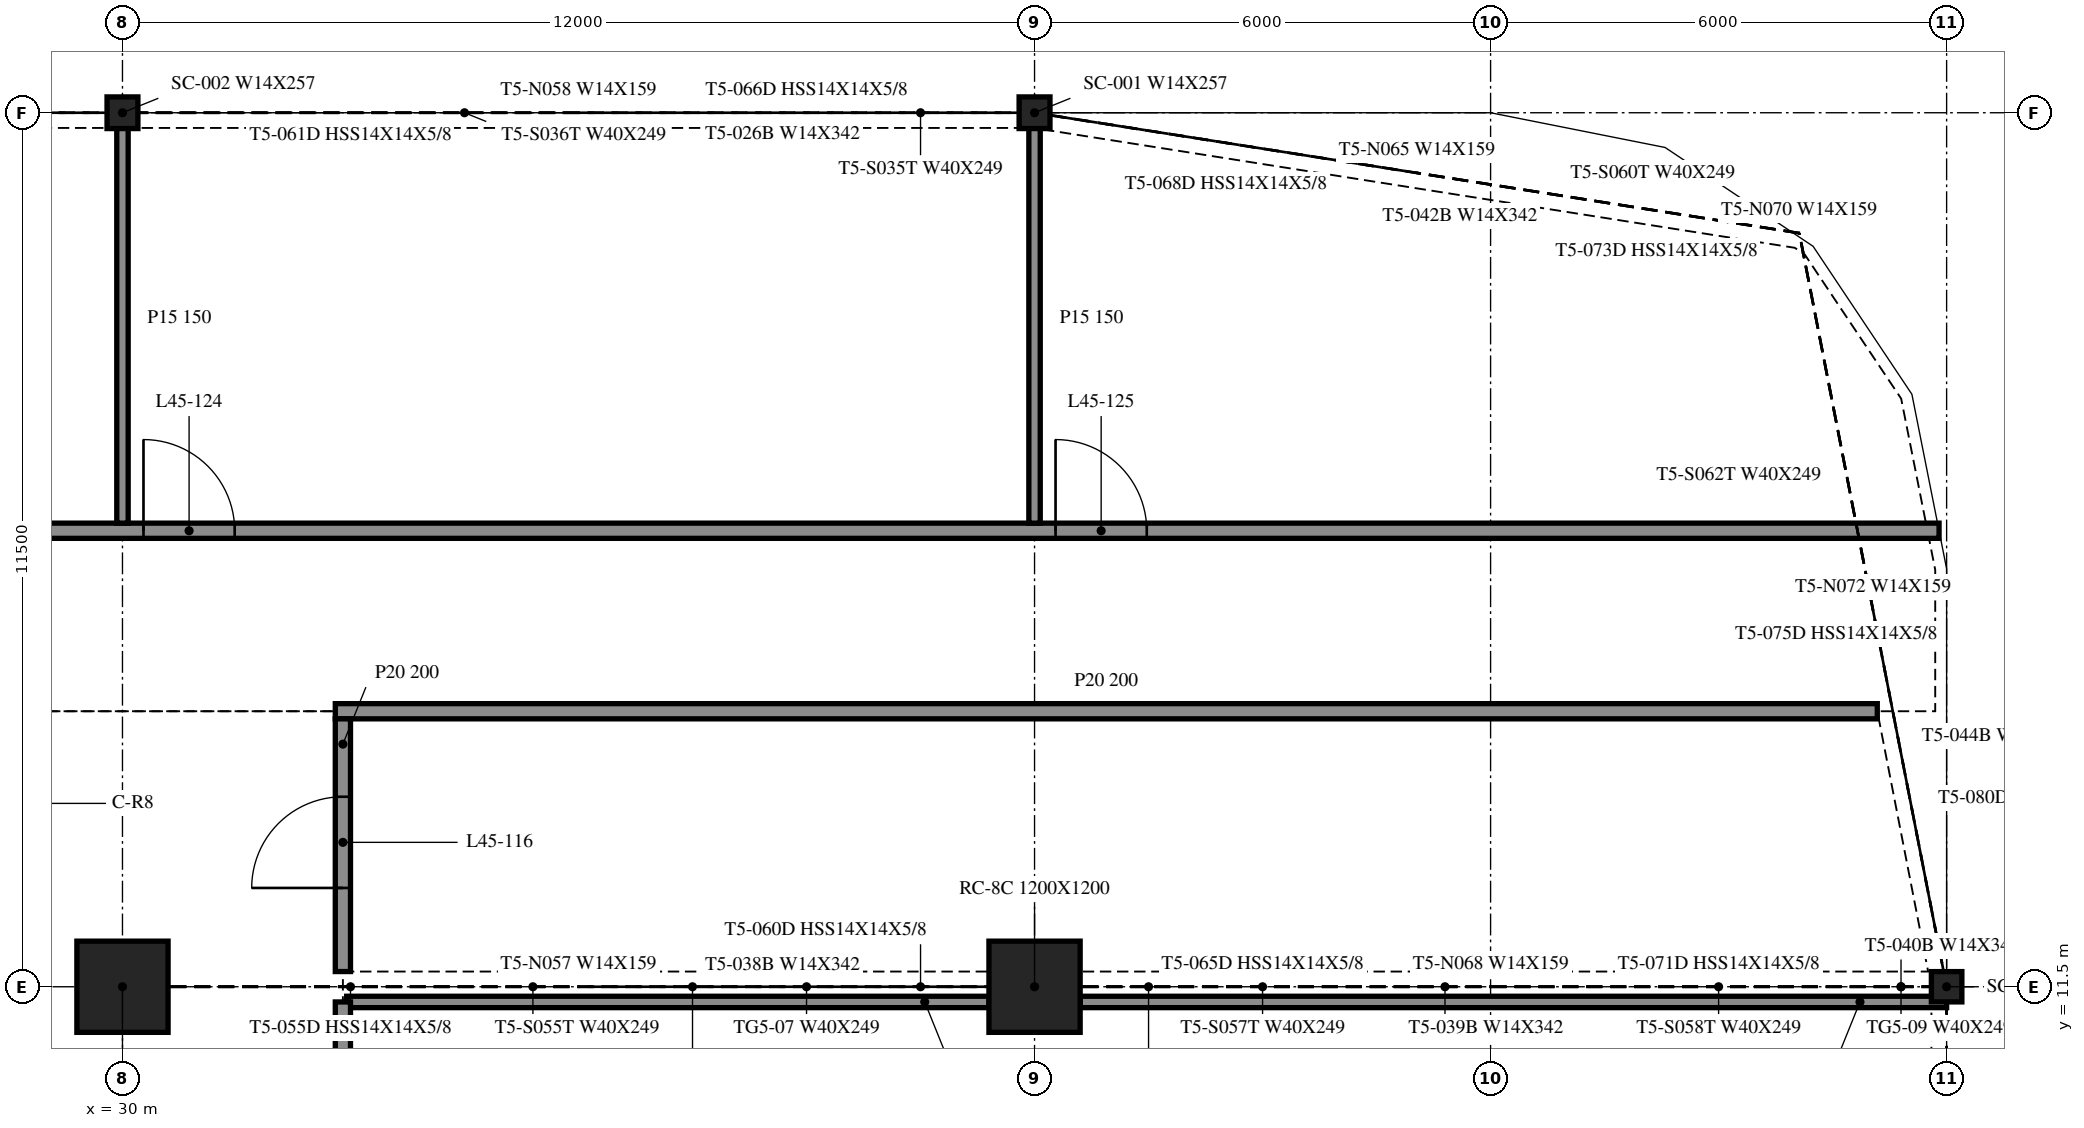
"""IFC4 building model, lengths in metres.
Left out: names, types, materials, properties, quantities, classifications, styles, units other than length and angle.
Written with IfcOpenShell. Run it as: python <this file> out.ifc"""

import sys

from ifc_helpers import new_model, si_unit, direction, frame, frame_2d, origin, origin_2d, place, context, subcontext, project, spatial, rectangle, i_section, extrude, element, fill, save


model = new_model("IFC4")
c1 = context("Model", 3, precision=1e-05, world=origin(), true_north=direction((0.0, 1.0)))
c2 = subcontext(c1, "Body", "Model", "MODEL_VIEW")
j1 = project(units=[si_unit("LENGTHUNIT", "METRE"), si_unit("PLANEANGLEUNIT", "RADIAN")], contexts=[c1])
p1 = place(None, origin())
s1 = spatial("IfcSite", under=j1, at=p1, CompositionType="ELEMENT")
p2 = place(p1, origin())
s2 = spatial("IfcBuilding", under=s1, at=p2, CompositionType="ELEMENT")
p3 = place(p2, frame((0.0, 0.0, 189.6)))
s3 = spatial("IfcBuildingStorey", under=s2, at=p3, CompositionType="ELEMENT", Elevation=189.6)
for number, where, z_axis, x_axis in (
    (1, (30.0, 11.5, -0.4), (0.0, 0.0, 1.0), (1.0, 0.0, 0.0)),
    (2, (42.0, 11.5, -0.4), (0.0, 0.0, 1.0), (1.0, 0.0, 0.0)),
):
    element("IfcColumn", number, at=place(p3, frame(where, z_axis=z_axis, x_axis=x_axis)), inside=s3, PredefinedType="COLUMN", context=c2, shape_type="SweptSolid", body=[
        extrude(rectangle(XDim=1.2, YDim=1.2, at=origin_2d()), origin(), (0.0, 0.0, 1.0), 4.36),
    ])
for number, where, z_axis, x_axis in (
    (3, (42.0, 23.0, -0.4), (0.0, 0.0, 1.0), (1.0, 0.0, 0.0)),
    (4, (30.0, 23.0, -0.4), (0.0, 0.0, 1.0), (1.0, 0.0, 0.0)),
):
    element("IfcColumn", number, at=place(p3, frame(where, z_axis=z_axis, x_axis=x_axis)), inside=s3, PredefinedType="COLUMN", context=c2, shape_type="SweptSolid", body=[
        extrude(i_section(OverallWidth=0.406, OverallDepth=0.417, WebThickness=0.03, FlangeThickness=0.048, at=origin_2d()), origin(), (0.0, 0.0, 1.0), 4.36),
    ])
p4 = place(p3, frame((54.0, 11.5, -0.4), z_axis=(0.0, 0.0, 1.0), x_axis=(1.0, 0.0, 0.0)))
e5 = element("IfcColumn", 5, at=p4, inside=s3, PredefinedType="COLUMN", context=c2, shape_type="SweptSolid", body=[
    extrude(i_section(OverallWidth=0.401, OverallDepth=0.399, WebThickness=0.025, FlangeThickness=0.04, at=origin_2d()), origin(), (0.0, 0.0, 1.0), 4.36),
])
p5 = place(p3, frame((32.95, 11.3, 0.0), z_axis=(0.0, 0.0, 1.0), x_axis=(1.0, 0.0, 0.0)))
e6 = element("IfcWall", 6, at=p5, inside=s3, PredefinedType="PARTITIONING", context=c2, shape_type="SweptSolid", body=[
    extrude(rectangle(XDim=8.45, YDim=0.15, at=frame_2d((4.225, 0.0))), origin(), (0.0, 0.0, 1.0), 3.96),
])
p6 = place(p3, frame((42.6, 11.3, 0.0), z_axis=(0.0, 0.0, 1.0), x_axis=(1.0, 0.0, 0.0)))
e7 = element("IfcWall", 7, at=p6, inside=s3, PredefinedType="PARTITIONING", context=c2, shape_type="SweptSolid", body=[
    extrude(rectangle(XDim=11.4, YDim=0.15, at=frame_2d((5.7, 0.0))), origin(), (0.0, 0.0, 1.0), 3.96),
])
p7 = place(p3, frame((32.8, 15.125, 0.0), z_axis=(0.0, 0.0, 1.0), x_axis=(1.0, 0.0, 0.0)))
e8 = element("IfcWall", 8, at=p7, inside=s3, PredefinedType="PARTITIONING", context=c2, shape_type="SweptSolid", body=[
    extrude(rectangle(XDim=20.288, YDim=0.2, at=frame_2d((10.144, 0.0))), origin(), (0.0, 0.0, 1.0), 3.96),
])
p8 = place(p3, frame((-40.624, 17.5, 0.0), z_axis=(0.0, 0.0, 1.0), x_axis=(1.0, 0.0, 0.0)))
e9 = element("IfcWall", 9, at=p8, inside=s3, PredefinedType="PARTITIONING", context=c2, shape_type="SweptSolid", body=[
    extrude(rectangle(XDim=94.524, YDim=0.2, at=frame_2d((47.262, 0.0))), origin(), (0.0, 0.0, 1.0), 3.96),
])
p9 = place(p8, frame((9.1, 0.0, 0.0)))
e10 = element("IfcOpeningElement", 10, at=p9, cuts=e9, PredefinedType="OPENING", context=c2, shape_type="SweptSolid", body=[
    extrude(rectangle(XDim=1.2, YDim=2.1, at=frame_2d((0.6, 1.05))), frame((0.0, 0.11, 0.0), z_axis=(0.0, -1.0, 0.0), x_axis=(1.0, 0.0, 0.0)), (0.0, 0.0, 1.0), 0.22),
])
p10 = place(p8, frame((21.1, 0.0, 0.0)))
e11 = element("IfcOpeningElement", 11, at=p10, cuts=e9, PredefinedType="OPENING", context=c2, shape_type="SweptSolid", body=[
    extrude(rectangle(XDim=1.2, YDim=2.1, at=frame_2d((0.6, 1.05))), frame((0.0, 0.11, 0.0), z_axis=(0.0, -1.0, 0.0), x_axis=(1.0, 0.0, 0.0)), (0.0, 0.0, 1.0), 0.22),
])
p11 = place(p8, frame((33.3, 0.0, 0.0)))
e12 = element("IfcOpeningElement", 12, at=p11, cuts=e9, PredefinedType="OPENING", context=c2, shape_type="SweptSolid", body=[
    extrude(rectangle(XDim=1.0, YDim=2.1, at=frame_2d((0.5, 1.05))), frame((0.0, 0.11, 0.0), z_axis=(0.0, -1.0, 0.0), x_axis=(1.0, 0.0, 0.0)), (0.0, 0.0, 1.0), 0.22),
])
p12 = place(p8, frame((45.5, 0.0, 0.0)))
e13 = element("IfcOpeningElement", 13, at=p12, cuts=e9, PredefinedType="OPENING", context=c2, shape_type="SweptSolid", body=[
    extrude(rectangle(XDim=0.9, YDim=2.1, at=frame_2d((0.45, 1.05))), frame((0.0, 0.11, 0.0), z_axis=(0.0, -1.0, 0.0), x_axis=(1.0, 0.0, 0.0)), (0.0, 0.0, 1.0), 0.22),
])
p13 = place(p8, frame((46.9, 0.0, 0.0)))
e14 = element("IfcOpeningElement", 14, at=p13, cuts=e9, PredefinedType="OPENING", context=c2, shape_type="SweptSolid", body=[
    extrude(rectangle(XDim=1.0, YDim=2.1, at=frame_2d((0.5, 1.05))), frame((0.0, 0.11, 0.0), z_axis=(0.0, -1.0, 0.0), x_axis=(1.0, 0.0, 0.0)), (0.0, 0.0, 1.0), 0.22),
])
p14 = place(p8, frame((58.9, 0.0, 0.0)))
e15 = element("IfcOpeningElement", 15, at=p14, cuts=e9, PredefinedType="OPENING", context=c2, shape_type="SweptSolid", body=[
    extrude(rectangle(XDim=1.0, YDim=2.1, at=frame_2d((0.5, 1.05))), frame((0.0, 0.11, 0.0), z_axis=(0.0, -1.0, 0.0), x_axis=(1.0, 0.0, 0.0)), (0.0, 0.0, 1.0), 0.22),
])
p15 = place(p8, frame((70.9, 0.0, 0.0)))
e16 = element("IfcOpeningElement", 16, at=p15, cuts=e9, PredefinedType="OPENING", context=c2, shape_type="SweptSolid", body=[
    extrude(rectangle(XDim=1.2, YDim=2.1, at=frame_2d((0.6, 1.05))), frame((0.0, 0.11, 0.0), z_axis=(0.0, -1.0, 0.0), x_axis=(1.0, 0.0, 0.0)), (0.0, 0.0, 1.0), 0.22),
])
p16 = place(p8, frame((82.9, 0.0, 0.0)))
e17 = element("IfcOpeningElement", 17, at=p16, cuts=e9, PredefinedType="OPENING", context=c2, shape_type="SweptSolid", body=[
    extrude(rectangle(XDim=1.2, YDim=2.1, at=frame_2d((0.6, 1.05))), frame((0.0, 0.11, 0.0), z_axis=(0.0, -1.0, 0.0), x_axis=(1.0, 0.0, 0.0)), (0.0, 0.0, 1.0), 0.22),
])
p17 = place(p3, frame((30.0, 17.6, 0.0), z_axis=(0.0, 0.0, 1.0), x_axis=(0.0, 1.0, 0.0)))
e18 = element("IfcWall", 18, at=p17, inside=s3, PredefinedType="PARTITIONING", context=c2, shape_type="SweptSolid", body=[
    extrude(rectangle(XDim=5.4, YDim=0.15, at=frame_2d((2.7, 0.0))), origin(), (0.0, 0.0, 1.0), 3.96),
])
p18 = place(p3, frame((32.9, 0.2, 0.0), z_axis=(0.0, 0.0, 1.0), x_axis=(0.0, 1.0, 0.0)))
e19 = element("IfcWall", 19, at=p18, inside=s3, PredefinedType="PARTITIONING", context=c2, shape_type="SweptSolid", body=[
    extrude(rectangle(XDim=11.1, YDim=0.2, at=frame_2d((5.55, 0.0))), origin(), (0.0, 0.0, 1.0), 3.96),
])
p19 = place(p18, frame((4.9, 0.0, 0.0)))
e20 = element("IfcOpeningElement", 20, at=p19, cuts=e19, PredefinedType="OPENING", context=c2, shape_type="SweptSolid", body=[
    extrude(rectangle(XDim=1.2, YDim=2.1, at=frame_2d((0.6, 1.05))), frame((0.0, 0.11, 0.0), z_axis=(0.0, -1.0, 0.0), x_axis=(1.0, 0.0, 0.0)), (0.0, 0.0, 1.0), 0.22),
])
p20 = place(p3, frame((32.9, 11.7, 0.0), z_axis=(0.0, 0.0, 1.0), x_axis=(0.0, 1.0, 0.0)))
e21 = element("IfcWall", 21, at=p20, inside=s3, PredefinedType="PARTITIONING", context=c2, shape_type="SweptSolid", body=[
    extrude(rectangle(XDim=3.325, YDim=0.2, at=frame_2d((1.663, 0.0))), origin(), (0.0, 0.0, 1.0), 3.96),
])
p21 = place(p20, frame((1.1, 0.0, 0.0)))
e22 = element("IfcOpeningElement", 22, at=p21, cuts=e21, PredefinedType="OPENING", context=c2, shape_type="SweptSolid", body=[
    extrude(rectangle(XDim=1.2, YDim=2.1, at=frame_2d((0.6, 1.05))), frame((0.0, 0.11, 0.0), z_axis=(0.0, -1.0, 0.0), x_axis=(1.0, 0.0, 0.0)), (0.0, 0.0, 1.0), 0.22),
])
p22 = place(p3, frame((42.0, 17.6, 0.0), z_axis=(0.0, 0.0, 1.0), x_axis=(0.0, 1.0, 0.0)))
e23 = element("IfcWall", 23, at=p22, inside=s3, PredefinedType="PARTITIONING", context=c2, shape_type="SweptSolid", body=[
    extrude(rectangle(XDim=5.4, YDim=0.15, at=frame_2d((2.7, 0.0))), origin(), (0.0, 0.0, 1.0), 3.96),
])
p23 = place(p21, origin())
e24 = element("IfcDoor", 24, at=p23, inside=s3, OperationType="SINGLE_SWING_LEFT", PredefinedType="DOOR", context=c2, shape_type="SweptSolid", body=[
    extrude(rectangle(XDim=1.2, YDim=2.1, at=frame_2d((0.6, 1.05))), frame((0.0, 0.025, 0.0), z_axis=(0.0, -1.0, 0.0), x_axis=(1.0, 0.0, 0.0)), (0.0, 0.0, 1.0), 0.05),
])
fill(e22, e24)
p24 = place(p15, origin())
e25 = element("IfcDoor", 25, at=p24, inside=s3, OperationType="SINGLE_SWING_RIGHT", PredefinedType="DOOR", context=c2, shape_type="SweptSolid", body=[
    extrude(rectangle(XDim=1.2, YDim=2.1, at=frame_2d((0.6, 1.05))), frame((0.0, 0.025, 0.0), z_axis=(0.0, -1.0, 0.0), x_axis=(1.0, 0.0, 0.0)), (0.0, 0.0, 1.0), 0.05),
])
fill(e16, e25)
p25 = place(p16, origin())
e26 = element("IfcDoor", 26, at=p25, inside=s3, OperationType="SINGLE_SWING_RIGHT", PredefinedType="DOOR", context=c2, shape_type="SweptSolid", body=[
    extrude(rectangle(XDim=1.2, YDim=2.1, at=frame_2d((0.6, 1.05))), frame((0.0, 0.025, 0.0), z_axis=(0.0, -1.0, 0.0), x_axis=(1.0, 0.0, 0.0)), (0.0, 0.0, 1.0), 0.05),
])
fill(e17, e26)
save(model, sys.argv[1])
